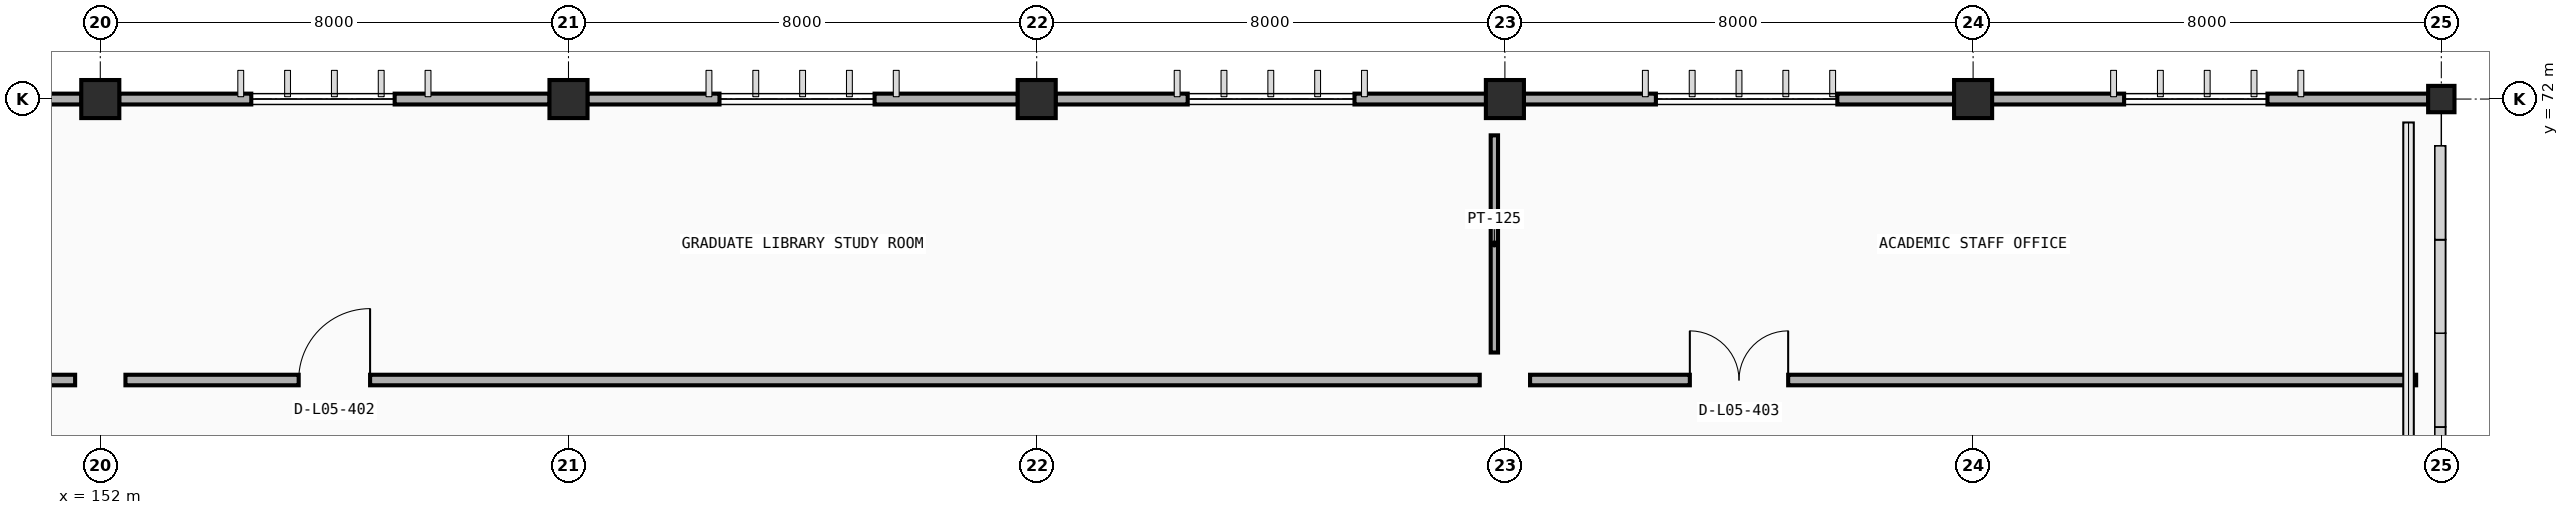
"""IFC4 building model, lengths in metres.
Left out: names, types, materials, properties, quantities, classifications, styles, units other than length and angle.
Written with IfcOpenShell. Run it as: python <this file> out.ifc"""

import sys

from ifc_helpers import new_model, si_unit, direction, frame, frame_2d, origin, origin_2d, place, context, subcontext, project, spatial, rectangle, extrude, element, fill, save


model = new_model("IFC4")
c1 = context("Model", 3, precision=1e-05, world=origin(), true_north=direction((0.0, 1.0)))
c2 = subcontext(c1, "Body", "Model", "MODEL_VIEW")
j1 = project(units=[si_unit("LENGTHUNIT", "METRE"), si_unit("PLANEANGLEUNIT", "RADIAN")], contexts=[c1])
p1 = place(None, origin())
s1 = spatial("IfcSite", under=j1, at=p1, CompositionType="ELEMENT")
p2 = place(p1, origin())
s2 = spatial("IfcBuilding", under=s1, at=p2, CompositionType="ELEMENT")
p3 = place(p2, frame((0.0, 0.0, 18.0)))
s3 = spatial("IfcBuildingStorey", under=s2, at=p3, CompositionType="ELEMENT", Elevation=18.0)
for number, where, z_axis, x_axis in (
    (1, (152.0, 72.0, 0.0), (0.0, 0.0, 1.0), (1.0, 0.0, 0.0)),
    (2, (160.0, 72.0, 0.0), (0.0, 0.0, 1.0), (1.0, 0.0, 0.0)),
    (3, (168.0, 72.0, 0.0), (0.0, 0.0, 1.0), (1.0, 0.0, 0.0)),
    (4, (176.0, 72.0, 0.0), (0.0, 0.0, 1.0), (1.0, 0.0, 0.0)),
    (5, (184.0, 72.0, 0.0), (0.0, 0.0, 1.0), (1.0, 0.0, 0.0)),
):
    element("IfcColumn", number, at=place(p3, frame(where, z_axis=z_axis, x_axis=x_axis)), inside=s3, PredefinedType="COLUMN", context=c2, shape_type="SweptSolid", body=[
        extrude(rectangle(XDim=0.65, YDim=0.65, at=origin_2d()), origin(), (0.0, 0.0, 1.0), 4.2),
    ])
p4 = place(p3, frame((192.0, 72.0, 0.0), z_axis=(0.0, 0.0, 1.0), x_axis=(1.0, 0.0, 0.0)))
e6 = element("IfcColumn", 6, at=p4, inside=s3, PredefinedType="COLUMN", context=c2, shape_type="SweptSolid", body=[
    extrude(rectangle(XDim=0.45, YDim=0.45, at=origin_2d()), origin(), (0.0, 0.0, 1.0), 4.2),
])
p5 = place(p3, frame((144.322, 72.0, 0.0), z_axis=(0.0, 0.0, 1.0), x_axis=(1.0, 0.0, 0.0)))
e7 = element("IfcWall", 7, at=p5, inside=s3, PredefinedType="STANDARD", context=c2, shape_type="SweptSolid", body=[
    extrude(rectangle(XDim=7.356, YDim=0.185, at=frame_2d((3.678, 0.0))), origin(), (0.0, 0.0, 1.0), 3.335),
])
p6 = place(p5, frame((2.258, 0.0, 0.9)))
e8 = element("IfcOpeningElement", 8, at=p6, cuts=e7, PredefinedType="OPENING", context=c2, shape_type="SweptSolid", body=[
    extrude(rectangle(XDim=3.1, YDim=1.6, at=frame_2d((1.55, 0.8))), frame((0.0, 0.103, 0.0), z_axis=(0.0, -1.0, 0.0), x_axis=(1.0, 0.0, 0.0)), (0.0, 0.0, 1.0), 0.205),
])
p7 = place(p3, frame((152.322, 72.0, 0.0), z_axis=(0.0, 0.0, 1.0), x_axis=(1.0, 0.0, 0.0)))
e9 = element("IfcWall", 9, at=p7, inside=s3, PredefinedType="STANDARD", context=c2, shape_type="SweptSolid", body=[
    extrude(rectangle(XDim=7.356, YDim=0.185, at=frame_2d((3.678, 0.0))), origin(), (0.0, 0.0, 1.0), 3.335),
])
p8 = place(p7, frame((2.258, 0.0, 0.9)))
e10 = element("IfcOpeningElement", 10, at=p8, cuts=e9, PredefinedType="OPENING", context=c2, shape_type="SweptSolid", body=[
    extrude(rectangle(XDim=2.45, YDim=2.0, at=frame_2d((1.225, 1.0))), frame((0.0, 0.103, 0.0), z_axis=(0.0, -1.0, 0.0), x_axis=(1.0, 0.0, 0.0)), (0.0, 0.0, 1.0), 0.205),
])
p9 = place(p3, frame((160.322, 72.0, 0.0), z_axis=(0.0, 0.0, 1.0), x_axis=(1.0, 0.0, 0.0)))
e11 = element("IfcWall", 11, at=p9, inside=s3, PredefinedType="STANDARD", context=c2, shape_type="SweptSolid", body=[
    extrude(rectangle(XDim=7.356, YDim=0.185, at=frame_2d((3.678, 0.0))), origin(), (0.0, 0.0, 1.0), 3.335),
])
p10 = place(p9, frame((2.258, 0.0, 0.9)))
e12 = element("IfcOpeningElement", 12, at=p10, cuts=e11, PredefinedType="OPENING", context=c2, shape_type="SweptSolid", body=[
    extrude(rectangle(XDim=2.65, YDim=2.0, at=frame_2d((1.325, 1.0))), frame((0.0, 0.103, 0.0), z_axis=(0.0, -1.0, 0.0), x_axis=(1.0, 0.0, 0.0)), (0.0, 0.0, 1.0), 0.205),
])
p11 = place(p3, frame((168.322, 72.0, 0.0), z_axis=(0.0, 0.0, 1.0), x_axis=(1.0, 0.0, 0.0)))
e13 = element("IfcWall", 13, at=p11, inside=s3, PredefinedType="STANDARD", context=c2, shape_type="SweptSolid", body=[
    extrude(rectangle(XDim=7.356, YDim=0.185, at=frame_2d((3.678, 0.0))), origin(), (0.0, 0.0, 1.0), 3.335),
])
p12 = place(p11, frame((2.258, 0.0, 0.9)))
e14 = element("IfcOpeningElement", 14, at=p12, cuts=e13, PredefinedType="OPENING", context=c2, shape_type="SweptSolid", body=[
    extrude(rectangle(XDim=2.85, YDim=2.0, at=frame_2d((1.425, 1.0))), frame((0.0, 0.103, 0.0), z_axis=(0.0, -1.0, 0.0), x_axis=(1.0, 0.0, 0.0)), (0.0, 0.0, 1.0), 0.205),
])
p13 = place(p3, frame((176.322, 72.0, 0.0), z_axis=(0.0, 0.0, 1.0), x_axis=(1.0, 0.0, 0.0)))
e15 = element("IfcWall", 15, at=p13, inside=s3, PredefinedType="STANDARD", context=c2, shape_type="SweptSolid", body=[
    extrude(rectangle(XDim=7.356, YDim=0.185, at=frame_2d((3.678, 0.0))), origin(), (0.0, 0.0, 1.0), 3.335),
])
p14 = place(p13, frame((2.258, 0.0, 0.9)))
e16 = element("IfcOpeningElement", 16, at=p14, cuts=e15, PredefinedType="OPENING", context=c2, shape_type="SweptSolid", body=[
    extrude(rectangle(XDim=3.1, YDim=1.6, at=frame_2d((1.55, 0.8))), frame((0.0, 0.103, 0.0), z_axis=(0.0, -1.0, 0.0), x_axis=(1.0, 0.0, 0.0)), (0.0, 0.0, 1.0), 0.205),
])
p15 = place(p3, frame((184.322, 72.0, 0.0), z_axis=(0.0, 0.0, 1.0), x_axis=(1.0, 0.0, 0.0)))
e17 = element("IfcWall", 17, at=p15, inside=s3, PredefinedType="STANDARD", context=c2, shape_type="SweptSolid", body=[
    extrude(rectangle(XDim=7.456, YDim=0.185, at=frame_2d((3.728, 0.0))), origin(), (0.0, 0.0, 1.0), 3.35),
])
p16 = place(p15, frame((2.258, 0.0, 0.9)))
e18 = element("IfcOpeningElement", 18, at=p16, cuts=e17, PredefinedType="OPENING", context=c2, shape_type="SweptSolid", body=[
    extrude(rectangle(XDim=2.45, YDim=2.0, at=frame_2d((1.225, 1.0))), frame((0.0, 0.103, 0.0), z_axis=(0.0, -1.0, 0.0), x_axis=(1.0, 0.0, 0.0)), (0.0, 0.0, 1.0), 0.205),
])
p17 = place(p3, frame((191.76, 71.78, 0.0), z_axis=(0.0, 0.0, 1.0), x_axis=(-1.0, 0.0, 0.0)))
e19 = element("IfcWall", 19, at=p17, inside=s3, PredefinedType="PARAPET", context=c2, shape_type="SweptSolid", body=[
    extrude(rectangle(XDim=0.32, YDim=0.2, at=frame_2d((0.16, 0.0))), origin(), (0.0, 0.0, 1.0), 3.35),
])
p18 = place(p3, frame((128.43, 67.2, 0.0), z_axis=(0.0, 0.0, 1.0), x_axis=(1.0, 0.0, 0.0)))
e20 = element("IfcWall", 20, at=p18, inside=s3, PredefinedType="PARTITIONING", context=c2, shape_type="SweptSolid", body=[
    extrude(rectangle(XDim=23.14, YDim=0.18, at=frame_2d((11.57, 0.0))), origin(), (0.0, 0.0, 1.0), 3.3),
])
p19 = place(p18, frame((2.995, 0.0, 0.0)))
e21 = element("IfcOpeningElement", 21, at=p19, cuts=e20, PredefinedType="OPENING", context=c2, shape_type="SweptSolid", body=[
    extrude(rectangle(XDim=1.15, YDim=2.15, at=frame_2d((0.575, 1.075))), frame((0.0, 0.1, 0.0), z_axis=(0.0, -1.0, 0.0), x_axis=(1.0, 0.0, 0.0)), (0.0, 0.0, 1.0), 0.2),
])
p20 = place(p3, frame((152.43, 67.2, 0.0), z_axis=(0.0, 0.0, 1.0), x_axis=(1.0, 0.0, 0.0)))
e22 = element("IfcWall", 22, at=p20, inside=s3, PredefinedType="PARTITIONING", context=c2, shape_type="SweptSolid", body=[
    extrude(rectangle(XDim=23.14, YDim=0.18, at=frame_2d((11.57, 0.0))), origin(), (0.0, 0.0, 1.0), 3.3),
])
p21 = place(p20, frame((2.96, 0.0, 0.0)))
e23 = element("IfcOpeningElement", 23, at=p21, cuts=e22, PredefinedType="OPENING", context=c2, shape_type="SweptSolid", body=[
    extrude(rectangle(XDim=1.22, YDim=2.18, at=frame_2d((0.61, 1.09))), frame((0.0, 0.1, 0.0), z_axis=(0.0, -1.0, 0.0), x_axis=(1.0, 0.0, 0.0)), (0.0, 0.0, 1.0), 0.2),
])
p22 = place(p3, frame((175.82, 67.67, 0.0), z_axis=(0.0, 0.0, 1.0), x_axis=(0.0, 1.0, 0.0)))
e24 = element("IfcWall", 24, at=p22, inside=s3, PredefinedType="PARTITIONING", context=c2, shape_type="SweptSolid", body=[
    extrude(rectangle(XDim=3.71, YDim=0.125, at=frame_2d((1.855, 0.0))), origin(), (0.0, 0.0, 1.0), 3.3),
])
p23 = place(p3, frame((176.43, 67.2, 0.0), z_axis=(0.0, 0.0, 1.0), x_axis=(1.0, 0.0, 0.0)))
e25 = element("IfcWall", 25, at=p23, inside=s3, PredefinedType="PARTITIONING", context=c2, shape_type="SweptSolid", body=[
    extrude(rectangle(XDim=15.14, YDim=0.18, at=frame_2d((7.57, 0.0))), origin(), (0.0, 0.0, 1.0), 3.3),
])
p24 = place(p23, frame((2.73, 0.0, 0.0)))
e26 = element("IfcOpeningElement", 26, at=p24, cuts=e25, PredefinedType="OPENING", context=c2, shape_type="SweptSolid", body=[
    extrude(rectangle(XDim=1.68, YDim=2.25, at=frame_2d((0.84, 1.125))), frame((0.0, 0.1, 0.0), z_axis=(0.0, -1.0, 0.0), x_axis=(1.0, 0.0, 0.0)), (0.0, 0.0, 1.0), 0.2),
])
p25 = place(p8, origin())
e27 = element("IfcWindow", 27, at=p25, inside=s3, PartitioningType="DOUBLE_PANEL_VERTICAL", PredefinedType="WINDOW", context=c2, shape_type="SweptSolid", body=[
    extrude(rectangle(XDim=2.45, YDim=2.0, at=frame_2d((1.225, 1.0))), frame((0.0, 0.03, 0.0), z_axis=(0.0, -1.0, 0.0), x_axis=(1.0, 0.0, 0.0)), (0.0, 0.0, 1.0), 0.06),
])
fill(e10, e27)
p26 = place(p10, origin())
e28 = element("IfcWindow", 28, at=p26, inside=s3, PartitioningType="DOUBLE_PANEL_VERTICAL", PredefinedType="WINDOW", context=c2, shape_type="SweptSolid", body=[
    extrude(rectangle(XDim=2.65, YDim=2.0, at=frame_2d((1.325, 1.0))), frame((0.0, 0.03, 0.0), z_axis=(0.0, -1.0, 0.0), x_axis=(1.0, 0.0, 0.0)), (0.0, 0.0, 1.0), 0.06),
])
fill(e12, e28)
p27 = place(p12, origin())
e29 = element("IfcWindow", 29, at=p27, inside=s3, PartitioningType="DOUBLE_PANEL_VERTICAL", PredefinedType="WINDOW", context=c2, shape_type="SweptSolid", body=[
    extrude(rectangle(XDim=2.85, YDim=2.0, at=frame_2d((1.425, 1.0))), frame((0.0, 0.03, 0.0), z_axis=(0.0, -1.0, 0.0), x_axis=(1.0, 0.0, 0.0)), (0.0, 0.0, 1.0), 0.06),
])
fill(e14, e29)
p28 = place(p14, origin())
e30 = element("IfcWindow", 30, at=p28, inside=s3, PartitioningType="DOUBLE_PANEL_VERTICAL", PredefinedType="WINDOW", context=c2, shape_type="SweptSolid", body=[
    extrude(rectangle(XDim=3.1, YDim=1.6, at=frame_2d((1.55, 0.8))), frame((0.0, 0.03, 0.0), z_axis=(0.0, -1.0, 0.0), x_axis=(1.0, 0.0, 0.0)), (0.0, 0.0, 1.0), 0.06),
])
fill(e16, e30)
p29 = place(p16, origin())
e31 = element("IfcWindow", 31, at=p29, inside=s3, PartitioningType="DOUBLE_PANEL_VERTICAL", PredefinedType="WINDOW", context=c2, shape_type="SweptSolid", body=[
    extrude(rectangle(XDim=2.45, YDim=2.0, at=frame_2d((1.225, 1.0))), frame((0.0, 0.03, 0.0), z_axis=(0.0, -1.0, 0.0), x_axis=(1.0, 0.0, 0.0)), (0.0, 0.0, 1.0), 0.06),
])
fill(e18, e31)
p30 = place(p21, origin())
e32 = element("IfcDoor", 32, at=p30, inside=s3, OperationType="SINGLE_SWING_RIGHT", PredefinedType="DOOR", context=c2, shape_type="SweptSolid", body=[
    extrude(rectangle(XDim=1.22, YDim=2.18, at=frame_2d((0.61, 1.09))), frame((0.0, 0.025, 0.0), z_axis=(0.0, -1.0, 0.0), x_axis=(1.0, 0.0, 0.0)), (0.0, 0.0, 1.0), 0.05),
])
fill(e23, e32)
p31 = place(p24, origin())
e33 = element("IfcDoor", 33, at=p31, inside=s3, OperationType="DOUBLE_DOOR_SINGLE_SWING", PredefinedType="DOOR", context=c2, shape_type="SweptSolid", body=[
    extrude(rectangle(XDim=1.68, YDim=2.25, at=frame_2d((0.84, 1.125))), frame((0.0, 0.025, 0.0), z_axis=(0.0, -1.0, 0.0), x_axis=(1.0, 0.0, 0.0)), (0.0, 0.0, 1.0), 0.05),
])
fill(e26, e33)
save(model, sys.argv[1])
